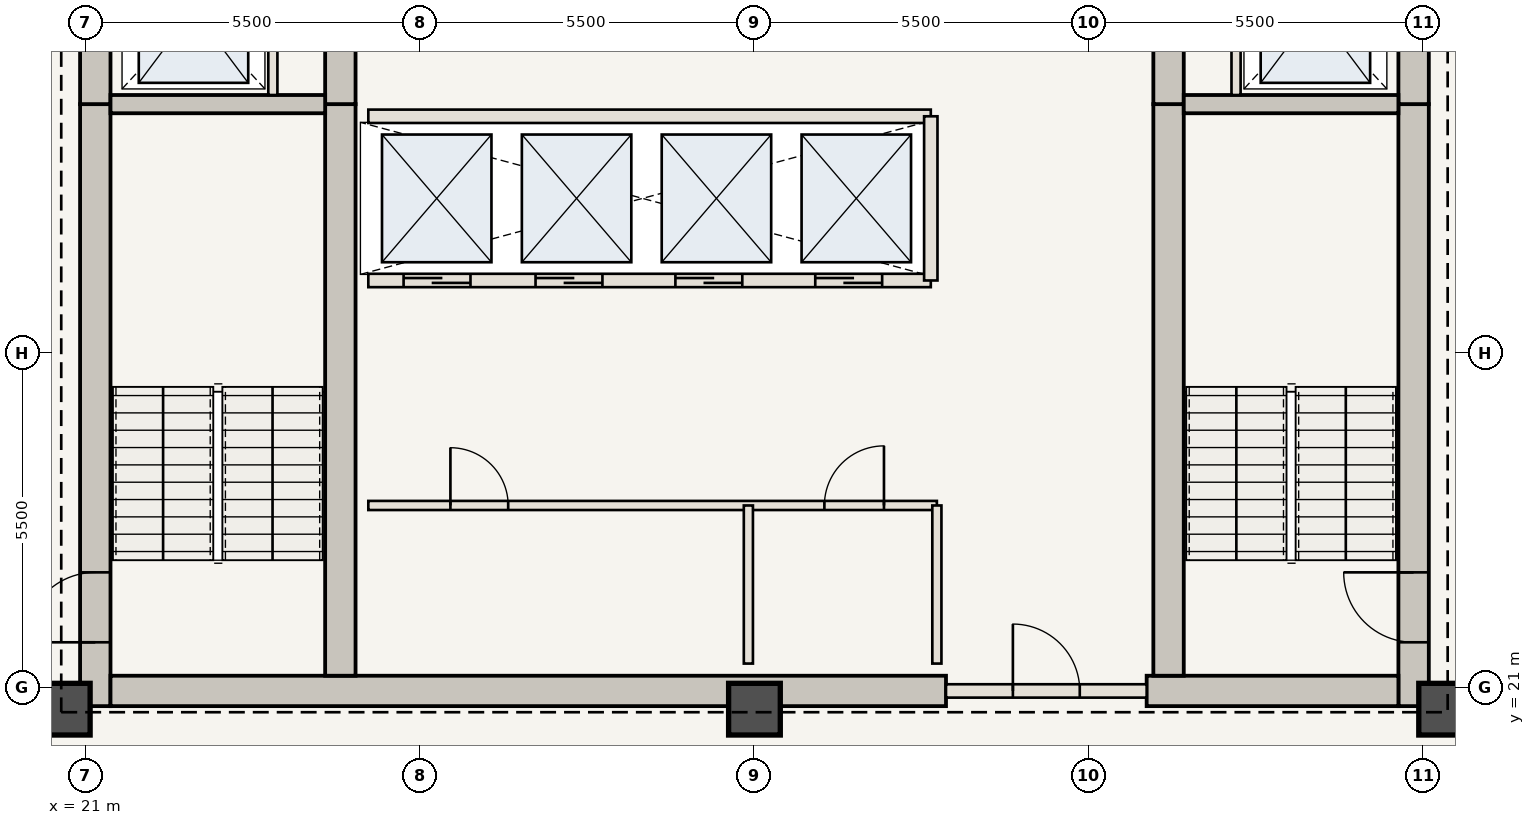
"""IFC4 building model, lengths in metres.
Left out: names, types, materials, properties, quantities, classifications, styles, units other than length and angle.
Written with IfcOpenShell. Run it as: python <this file> out.ifc"""

import sys

from ifc_helpers import new_model, si_unit, direction, frame, frame_2d, origin, origin_2d, place, context, subcontext, project, spatial, rectangle, extrude, element, fill, save


model = new_model("IFC4")
c1 = context("Model", 3, precision=1e-05, world=origin(), true_north=direction((0.0, 1.0)))
c2 = subcontext(c1, "Body", "Model", "MODEL_VIEW")
j1 = project(units=[si_unit("LENGTHUNIT", "METRE"), si_unit("PLANEANGLEUNIT", "RADIAN")], contexts=[c1])
p1 = place(None, origin())
s1 = spatial("IfcSite", under=j1, at=p1, CompositionType="ELEMENT")
p2 = place(p1, origin())
s2 = spatial("IfcBuilding", under=s1, at=p2, CompositionType="ELEMENT")
p3 = place(p2, frame((0.0, 0.0, 198.45)))
s3 = spatial("IfcBuildingStorey", under=s2, at=p3, CompositionType="ELEMENT", Elevation=198.45)
p4 = place(p3, frame((21.16, 20.7, 0.0), z_axis=(0.0, 0.0, 1.0), x_axis=(0.0, 1.0, 0.0)))
e1 = element("IfcWall", 1, at=p4, inside=s3, PredefinedType="SHEAR", context=c2, shape_type="SweptSolid", body=[
    extrude(rectangle(XDim=9.9, YDim=0.5, at=frame_2d((4.95, 0.0))), origin(), (0.0, 0.0, 1.0), 3.85),
])
p5 = place(p4, frame((1.05, 0.0, 0.0)))
e2 = element("IfcOpeningElement", 2, at=p5, cuts=e1, PredefinedType="OPENING", context=c2, shape_type="SweptSolid", body=[
    extrude(rectangle(XDim=1.15, YDim=2.15, at=frame_2d((0.575, 1.075))), frame((0.0, 0.26, 0.0), z_axis=(0.0, -1.0, 0.0), x_axis=(1.0, 0.0, 0.0)), (0.0, 0.0, 1.0), 0.52),
])
p6 = place(p3, frame((21.16, 30.6, 0.0), z_axis=(0.0, 0.0, 1.0), x_axis=(0.0, 1.0, 0.0)))
e3 = element("IfcWall", 3, at=p6, inside=s3, PredefinedType="SHEAR", context=c2, shape_type="SweptSolid", body=[
    extrude(rectangle(XDim=12.65, YDim=0.5, at=frame_2d((6.325, 0.0))), origin(), (0.0, 0.0, 1.0), 3.85),
])
p7 = place(p6, frame((4.2, 0.0, 0.0)))
e4 = element("IfcOpeningElement", 4, at=p7, cuts=e3, PredefinedType="OPENING", context=c2, shape_type="SweptSolid", body=[
    extrude(rectangle(XDim=1.1, YDim=2.15, at=frame_2d((0.55, 1.075))), frame((0.0, 0.26, 0.0), z_axis=(0.0, -1.0, 0.0), x_axis=(1.0, 0.0, 0.0)), (0.0, 0.0, 1.0), 0.52),
])
p8 = place(p6, frame((8.05, 0.0, 0.0)))
e5 = element("IfcOpeningElement", 5, at=p8, cuts=e3, PredefinedType="OPENING", context=c2, shape_type="SweptSolid", body=[
    extrude(rectangle(XDim=0.92, YDim=2.1, at=frame_2d((0.46, 1.05))), frame((0.0, 0.26, 0.0), z_axis=(0.0, -1.0, 0.0), x_axis=(1.0, 0.0, 0.0)), (0.0, 0.0, 1.0), 0.52),
])
p9 = place(p6, frame((9.45, 0.0, 0.0)))
e6 = element("IfcOpeningElement", 6, at=p9, cuts=e3, PredefinedType="OPENING", context=c2, shape_type="SweptSolid", body=[
    extrude(rectangle(XDim=0.88, YDim=2.1, at=frame_2d((0.44, 1.05))), frame((0.0, 0.26, 0.0), z_axis=(0.0, -1.0, 0.0), x_axis=(1.0, 0.0, 0.0)), (0.0, 0.0, 1.0), 0.52),
])
p10 = place(p6, frame((10.85, 0.0, 0.0)))
e7 = element("IfcOpeningElement", 7, at=p10, cuts=e3, PredefinedType="OPENING", context=c2, shape_type="SweptSolid", body=[
    extrude(rectangle(XDim=0.88, YDim=2.1, at=frame_2d((0.44, 1.05))), frame((0.0, 0.26, 0.0), z_axis=(0.0, -1.0, 0.0), x_axis=(1.0, 0.0, 0.0)), (0.0, 0.0, 1.0), 0.52),
])
p11 = place(p3, frame((42.84, 20.7, 0.0), z_axis=(0.0, 0.0, 1.0), x_axis=(0.0, 1.0, 0.0)))
e8 = element("IfcWall", 8, at=p11, inside=s3, PredefinedType="SHEAR", context=c2, shape_type="SweptSolid", body=[
    extrude(rectangle(XDim=9.9, YDim=0.5, at=frame_2d((4.95, 0.0))), origin(), (0.0, 0.0, 1.0), 3.85),
])
p12 = place(p11, frame((1.05, 0.0, 0.0)))
e9 = element("IfcOpeningElement", 9, at=p12, cuts=e8, PredefinedType="OPENING", context=c2, shape_type="SweptSolid", body=[
    extrude(rectangle(XDim=1.15, YDim=2.15, at=frame_2d((0.575, 1.075))), frame((0.0, 0.26, 0.0), z_axis=(0.0, -1.0, 0.0), x_axis=(1.0, 0.0, 0.0)), (0.0, 0.0, 1.0), 0.52),
])
p13 = place(p3, frame((42.84, 30.6, 0.0), z_axis=(0.0, 0.0, 1.0), x_axis=(0.0, 1.0, 0.0)))
e10 = element("IfcWall", 10, at=p13, inside=s3, PredefinedType="SHEAR", context=c2, shape_type="SweptSolid", body=[
    extrude(rectangle(XDim=12.65, YDim=0.5, at=frame_2d((6.325, 0.0))), origin(), (0.0, 0.0, 1.0), 3.85),
])
p14 = place(p13, frame((4.2, 0.0, 0.0)))
e11 = element("IfcOpeningElement", 11, at=p14, cuts=e10, PredefinedType="OPENING", context=c2, shape_type="SweptSolid", body=[
    extrude(rectangle(XDim=1.1, YDim=2.15, at=frame_2d((0.55, 1.075))), frame((0.0, 0.26, 0.0), z_axis=(0.0, -1.0, 0.0), x_axis=(1.0, 0.0, 0.0)), (0.0, 0.0, 1.0), 0.52),
])
p15 = place(p13, frame((9.2, 0.0, 0.0)))
e12 = element("IfcOpeningElement", 12, at=p15, cuts=e10, PredefinedType="OPENING", context=c2, shape_type="SweptSolid", body=[
    extrude(rectangle(XDim=0.92, YDim=2.1, at=frame_2d((0.46, 1.05))), frame((0.0, 0.26, 0.0), z_axis=(0.0, -1.0, 0.0), x_axis=(1.0, 0.0, 0.0)), (0.0, 0.0, 1.0), 0.52),
])
p16 = place(p3, frame((21.41, 20.95, 0.0), z_axis=(0.0, 0.0, 1.0), x_axis=(1.0, 0.0, 0.0)))
e13 = element("IfcWall", 13, at=p16, inside=s3, PredefinedType="SHEAR", context=c2, shape_type="SweptSolid", body=[
    extrude(rectangle(XDim=13.74, YDim=0.5, at=frame_2d((6.87, 0.0))), origin(), (0.0, 0.0, 1.0), 3.85),
])
p17 = place(p3, frame((38.45, 20.95, 0.0), z_axis=(0.0, 0.0, 1.0), x_axis=(1.0, 0.0, 0.0)))
e14 = element("IfcWall", 14, at=p17, inside=s3, PredefinedType="SHEAR", context=c2, shape_type="SweptSolid", body=[
    extrude(rectangle(XDim=4.14, YDim=0.5, at=frame_2d((2.07, 0.0))), origin(), (0.0, 0.0, 1.0), 3.85),
])
p18 = place(p3, frame((25.19, 21.2, 0.0), z_axis=(0.0, 0.0, 1.0), x_axis=(0.0, 1.0, 0.0)))
e15 = element("IfcWall", 15, at=p18, inside=s3, PredefinedType="SHEAR", context=c2, shape_type="SweptSolid", body=[
    extrude(rectangle(XDim=9.4, YDim=0.5, at=frame_2d((4.7, 0.0))), origin(), (0.0, 0.0, 1.0), 3.85),
])
p19 = place(p3, frame((25.19, 30.6, 0.0), z_axis=(0.0, 0.0, 1.0), x_axis=(0.0, 1.0, 0.0)))
e16 = element("IfcWall", 16, at=p19, inside=s3, PredefinedType="SHEAR", context=c2, shape_type="SweptSolid", body=[
    extrude(rectangle(XDim=12.15, YDim=0.5, at=frame_2d((6.075, 0.0))), origin(), (0.0, 0.0, 1.0), 3.85),
])
p20 = place(p19, frame((6.25, 0.0, 0.0)))
e17 = element("IfcOpeningElement", 17, at=p20, cuts=e16, PredefinedType="OPENING", context=c2, shape_type="SweptSolid", body=[
    extrude(rectangle(XDim=1.1, YDim=2.15, at=frame_2d((0.55, 1.075))), frame((0.0, 0.26, 0.0), z_axis=(0.0, -1.0, 0.0), x_axis=(1.0, 0.0, 0.0)), (0.0, 0.0, 1.0), 0.52),
])
p21 = place(p3, frame((38.81, 21.2, 0.0), z_axis=(0.0, 0.0, 1.0), x_axis=(0.0, 1.0, 0.0)))
e18 = element("IfcWall", 18, at=p21, inside=s3, PredefinedType="SHEAR", context=c2, shape_type="SweptSolid", body=[
    extrude(rectangle(XDim=9.4, YDim=0.5, at=frame_2d((4.7, 0.0))), origin(), (0.0, 0.0, 1.0), 3.85),
])
p22 = place(p3, frame((38.81, 30.6, 0.0), z_axis=(0.0, 0.0, 1.0), x_axis=(0.0, 1.0, 0.0)))
e19 = element("IfcWall", 19, at=p22, inside=s3, PredefinedType="SHEAR", context=c2, shape_type="SweptSolid", body=[
    extrude(rectangle(XDim=12.15, YDim=0.5, at=frame_2d((6.075, 0.0))), origin(), (0.0, 0.0, 1.0), 3.85),
])
for number, where, z_axis, x_axis in (
    (20, (20.65, 20.65, 0.0), (0.0, 0.0, 1.0), (1.0, 0.0, 0.0)),
    (21, (32.0, 20.65, 0.0), (0.0, 0.0, 1.0), (1.0, 0.0, 0.0)),
    (22, (43.35, 20.65, 0.0), (0.0, 0.0, 1.0), (1.0, 0.0, 0.0)),
):
    element("IfcColumn", number, at=place(p3, frame(where, z_axis=z_axis, x_axis=x_axis)), inside=s3, PredefinedType="COLUMN", context=c2, shape_type="SweptSolid", body=[
        extrude(rectangle(XDim=0.85, YDim=0.85, at=origin_2d()), origin(), (0.0, 0.0, 1.0), 3.85),
    ])
for number, where, z_axis, x_axis in (
    (23, (21.41, 30.6, 0.0), (0.0, 0.0, 1.0), (1.0, 0.0, 0.0)),
    (24, (39.06, 30.6, 0.0), (0.0, 0.0, 1.0), (1.0, 0.0, 0.0)),
):
    element("IfcWall", number, at=place(p3, frame(where, z_axis=z_axis, x_axis=x_axis)), inside=s3, PredefinedType="SHEAR", context=c2, shape_type="SweptSolid", body=[
        extrude(rectangle(XDim=3.53, YDim=0.3, at=frame_2d((1.765, 0.0))), origin(), (0.0, 0.0, 1.0), 3.685),
    ])
for number, where, z_axis, x_axis in (
    (25, (24.08, 30.75, 0.0), (0.0, 0.0, 1.0), (0.0, 1.0, 0.0)),
    (26, (39.92, 30.75, 0.0), (0.0, 0.0, 1.0), (0.0, 1.0, 0.0)),
):
    element("IfcWall", number, at=place(p3, frame(where, z_axis=z_axis, x_axis=x_axis)), inside=s3, PredefinedType="STANDARD", context=c2, shape_type="SweptSolid", body=[
        extrude(rectangle(XDim=2.65, YDim=0.15, at=frame_2d((1.325, 0.0))), origin(), (0.0, 0.0, 1.0), 3.685),
    ])
p23 = place(p3, frame((35.15, 20.95, 0.0), z_axis=(0.0, 0.0, 1.0), x_axis=(1.0, 0.0, 0.0)))
e27 = element("IfcWall", 27, at=p23, inside=s3, PredefinedType="STANDARD", context=c2, shape_type="SweptSolid", body=[
    extrude(rectangle(XDim=3.3, YDim=0.22, at=frame_2d((1.65, 0.0))), origin(), (0.0, 0.0, 1.0), 3.685),
])
p24 = place(p23, frame((1.1, 0.0, 0.0)))
e28 = element("IfcOpeningElement", 28, at=p24, cuts=e27, PredefinedType="OPENING", context=c2, shape_type="SweptSolid", body=[
    extrude(rectangle(XDim=1.1, YDim=2.15, at=frame_2d((0.55, 1.075))), frame((0.0, 0.12, 0.0), z_axis=(0.0, -1.0, 0.0), x_axis=(1.0, 0.0, 0.0)), (0.0, 0.0, 1.0), 0.24),
])
p25 = place(p3, frame((25.65, 24.0, 0.0), z_axis=(0.0, 0.0, 1.0), x_axis=(1.0, 0.0, 0.0)))
e29 = element("IfcWall", 29, at=p25, inside=s3, PredefinedType="STANDARD", context=c2, shape_type="SweptSolid", body=[
    extrude(rectangle(XDim=9.35, YDim=0.15, at=frame_2d((4.675, 0.0))), origin(), (0.0, 0.0, 1.0), 3.685),
])
p26 = place(p25, frame((1.35, 0.0, 0.0)))
e30 = element("IfcOpeningElement", 30, at=p26, cuts=e29, PredefinedType="OPENING", context=c2, shape_type="SweptSolid", body=[
    extrude(rectangle(XDim=0.95, YDim=2.15, at=frame_2d((0.475, 1.075))), frame((0.0, 0.085, 0.0), z_axis=(0.0, -1.0, 0.0), x_axis=(1.0, 0.0, 0.0)), (0.0, 0.0, 1.0), 0.17),
])
p27 = place(p25, frame((7.5, 0.0, 0.0)))
e31 = element("IfcOpeningElement", 31, at=p27, cuts=e29, PredefinedType="OPENING", context=c2, shape_type="SweptSolid", body=[
    extrude(rectangle(XDim=0.98, YDim=2.2, at=frame_2d((0.49, 1.1))), frame((0.0, 0.085, 0.0), z_axis=(0.0, -1.0, 0.0), x_axis=(1.0, 0.0, 0.0)), (0.0, 0.0, 1.0), 0.17),
])
for number, where, z_axis, x_axis in (
    (32, (31.9, 21.4, 0.0), (0.0, 0.0, 1.0), (0.0, 1.0, 0.0)),
    (33, (35.0, 21.4, 0.0), (0.0, 0.0, 1.0), (0.0, 1.0, 0.0)),
):
    element("IfcWall", number, at=place(p3, frame(where, z_axis=z_axis, x_axis=x_axis)), inside=s3, PredefinedType="STANDARD", context=c2, shape_type="SweptSolid", body=[
        extrude(rectangle(XDim=2.6, YDim=0.15, at=frame_2d((1.3, 0.0))), origin(), (0.0, 0.0, 1.0), 3.685),
    ])
p28 = place(p3, frame((25.65, 27.7, 0.0), z_axis=(0.0, 0.0, 1.0), x_axis=(1.0, 0.0, 0.0)))
e34 = element("IfcWall", 34, at=p28, inside=s3, PredefinedType="STANDARD", context=c2, shape_type="SweptSolid", body=[
    extrude(rectangle(XDim=9.25, YDim=0.22, at=frame_2d((4.625, 0.0))), origin(), (0.0, 0.0, 1.0), 3.685),
])
p29 = place(p28, frame((0.58, 0.0, 0.0)))
e35 = element("IfcOpeningElement", 35, at=p29, cuts=e34, PredefinedType="OPENING", context=c2, shape_type="SweptSolid", body=[
    extrude(rectangle(XDim=1.1, YDim=2.15, at=frame_2d((0.55, 1.075))), frame((0.0, 0.12, 0.0), z_axis=(0.0, -1.0, 0.0), x_axis=(1.0, 0.0, 0.0)), (0.0, 0.0, 1.0), 0.24),
])
p30 = place(p28, frame((2.75, 0.0, 0.0)))
e36 = element("IfcOpeningElement", 36, at=p30, cuts=e34, PredefinedType="OPENING", context=c2, shape_type="SweptSolid", body=[
    extrude(rectangle(XDim=1.1, YDim=2.15, at=frame_2d((0.55, 1.075))), frame((0.0, 0.12, 0.0), z_axis=(0.0, -1.0, 0.0), x_axis=(1.0, 0.0, 0.0)), (0.0, 0.0, 1.0), 0.24),
])
p31 = place(p28, frame((5.05, 0.0, 0.0)))
e37 = element("IfcOpeningElement", 37, at=p31, cuts=e34, PredefinedType="OPENING", context=c2, shape_type="SweptSolid", body=[
    extrude(rectangle(XDim=1.1, YDim=2.15, at=frame_2d((0.55, 1.075))), frame((0.0, 0.12, 0.0), z_axis=(0.0, -1.0, 0.0), x_axis=(1.0, 0.0, 0.0)), (0.0, 0.0, 1.0), 0.24),
])
p32 = place(p28, frame((7.35, 0.0, 0.0)))
e38 = element("IfcOpeningElement", 38, at=p32, cuts=e34, PredefinedType="OPENING", context=c2, shape_type="SweptSolid", body=[
    extrude(rectangle(XDim=1.1, YDim=2.15, at=frame_2d((0.55, 1.075))), frame((0.0, 0.12, 0.0), z_axis=(0.0, -1.0, 0.0), x_axis=(1.0, 0.0, 0.0)), (0.0, 0.0, 1.0), 0.24),
])
p33 = place(p3, frame((25.65, 30.4, 0.0), z_axis=(0.0, 0.0, 1.0), x_axis=(1.0, 0.0, 0.0)))
e39 = element("IfcWall", 39, at=p33, inside=s3, PredefinedType="STANDARD", context=c2, shape_type="SweptSolid", body=[
    extrude(rectangle(XDim=9.25, YDim=0.22, at=frame_2d((4.625, 0.0))), origin(), (0.0, 0.0, 1.0), 3.685),
])
p34 = place(p3, frame((34.9, 27.7, 0.0), z_axis=(0.0, 0.0, 1.0), x_axis=(0.0, 1.0, 0.0)))
e40 = element("IfcWall", 40, at=p34, inside=s3, PredefinedType="STANDARD", context=c2, shape_type="SweptSolid", body=[
    extrude(rectangle(XDim=2.7, YDim=0.22, at=frame_2d((1.35, 0.0))), origin(), (0.0, 0.0, 1.0), 3.685),
])
p35 = place(p5, origin())
e41 = element("IfcDoor", 41, at=p35, inside=s3, OperationType="SINGLE_SWING_LEFT", PredefinedType="DOOR", context=c2, shape_type="SweptSolid", body=[
    extrude(rectangle(XDim=1.15, YDim=2.15, at=frame_2d((0.575, 1.075))), frame((0.0, 0.025, 0.0), z_axis=(0.0, -1.0, 0.0), x_axis=(1.0, 0.0, 0.0)), (0.0, 0.0, 1.0), 0.05),
])
fill(e2, e41)
p36 = place(p12, origin())
e42 = element("IfcDoor", 42, at=p36, inside=s3, OperationType="SINGLE_SWING_RIGHT", PredefinedType="DOOR", context=c2, shape_type="SweptSolid", body=[
    extrude(rectangle(XDim=1.15, YDim=2.15, at=frame_2d((0.575, 1.075))), frame((0.0, 0.025, 0.0), z_axis=(0.0, -1.0, 0.0), x_axis=(1.0, 0.0, 0.0)), (0.0, 0.0, 1.0), 0.05),
])
fill(e9, e42)
p37 = place(p24, origin())
e43 = element("IfcDoor", 43, at=p37, inside=s3, OperationType="SINGLE_SWING_LEFT", PredefinedType="DOOR", context=c2, shape_type="SweptSolid", body=[
    extrude(rectangle(XDim=1.1, YDim=2.15, at=frame_2d((0.55, 1.075))), frame((0.0, 0.025, 0.0), z_axis=(0.0, -1.0, 0.0), x_axis=(1.0, 0.0, 0.0)), (0.0, 0.0, 1.0), 0.05),
])
fill(e28, e43)
p38 = place(p26, origin())
e44 = element("IfcDoor", 44, at=p38, inside=s3, OperationType="SINGLE_SWING_LEFT", PredefinedType="DOOR", context=c2, shape_type="SweptSolid", body=[
    extrude(rectangle(XDim=0.95, YDim=2.15, at=frame_2d((0.475, 1.075))), frame((0.0, 0.025, 0.0), z_axis=(0.0, -1.0, 0.0), x_axis=(1.0, 0.0, 0.0)), (0.0, 0.0, 1.0), 0.05),
])
fill(e30, e44)
p39 = place(p27, origin())
e45 = element("IfcDoor", 45, at=p39, inside=s3, OperationType="SINGLE_SWING_RIGHT", PredefinedType="DOOR", context=c2, shape_type="SweptSolid", body=[
    extrude(rectangle(XDim=0.98, YDim=2.2, at=frame_2d((0.49, 1.1))), frame((0.0, 0.025, 0.0), z_axis=(0.0, -1.0, 0.0), x_axis=(1.0, 0.0, 0.0)), (0.0, 0.0, 1.0), 0.05),
])
fill(e31, e45)
p40 = place(p29, origin())
e46 = element("IfcDoor", 46, at=p40, inside=s3, OperationType="DOUBLE_DOOR_SLIDING", PredefinedType="DOOR", context=c2, shape_type="SweptSolid", body=[
    extrude(rectangle(XDim=1.1, YDim=2.15, at=frame_2d((0.55, 1.075))), frame((0.0, 0.025, 0.0), z_axis=(0.0, -1.0, 0.0), x_axis=(1.0, 0.0, 0.0)), (0.0, 0.0, 1.0), 0.05),
])
fill(e35, e46)
p41 = place(p30, origin())
e47 = element("IfcDoor", 47, at=p41, inside=s3, OperationType="DOUBLE_DOOR_SLIDING", PredefinedType="DOOR", context=c2, shape_type="SweptSolid", body=[
    extrude(rectangle(XDim=1.1, YDim=2.15, at=frame_2d((0.55, 1.075))), frame((0.0, 0.025, 0.0), z_axis=(0.0, -1.0, 0.0), x_axis=(1.0, 0.0, 0.0)), (0.0, 0.0, 1.0), 0.05),
])
fill(e36, e47)
p42 = place(p31, origin())
e48 = element("IfcDoor", 48, at=p42, inside=s3, OperationType="DOUBLE_DOOR_SLIDING", PredefinedType="DOOR", context=c2, shape_type="SweptSolid", body=[
    extrude(rectangle(XDim=1.1, YDim=2.15, at=frame_2d((0.55, 1.075))), frame((0.0, 0.025, 0.0), z_axis=(0.0, -1.0, 0.0), x_axis=(1.0, 0.0, 0.0)), (0.0, 0.0, 1.0), 0.05),
])
fill(e37, e48)
p43 = place(p32, origin())
e49 = element("IfcDoor", 49, at=p43, inside=s3, OperationType="DOUBLE_DOOR_SLIDING", PredefinedType="DOOR", context=c2, shape_type="SweptSolid", body=[
    extrude(rectangle(XDim=1.1, YDim=2.15, at=frame_2d((0.55, 1.075))), frame((0.0, 0.025, 0.0), z_axis=(0.0, -1.0, 0.0), x_axis=(1.0, 0.0, 0.0)), (0.0, 0.0, 1.0), 0.05),
])
fill(e38, e49)
save(model, sys.argv[1])
